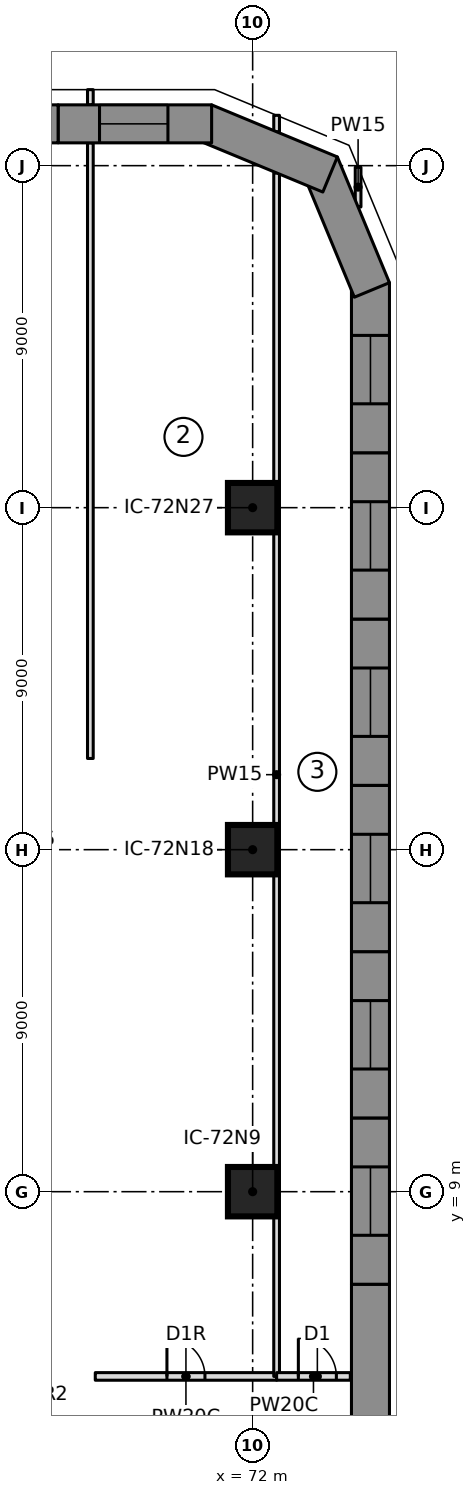
"""IFC4 building model, lengths in metres.
Left out: names, types, materials, properties, quantities, classifications, styles, units other than length and angle.
Written with IfcOpenShell. Run it as: python <this file> out.ifc"""

import sys

from ifc_helpers import new_model, si_unit, direction, frame, frame_2d, origin, origin_2d, place, context, subcontext, project, spatial, polyline, rectangle, outline, extrude, element, fill, save


model = new_model("IFC4")
c1 = context("Model", 3, precision=1e-05, world=origin(), true_north=direction((0.0, 1.0)))
c2 = subcontext(c1, "Body", "Model", "MODEL_VIEW")
j1 = project(units=[si_unit("LENGTHUNIT", "METRE"), si_unit("PLANEANGLEUNIT", "RADIAN")], contexts=[c1])
p1 = place(None, origin())
s1 = spatial("IfcSite", under=j1, at=p1, CompositionType="ELEMENT")
p2 = place(p1, origin())
s2 = spatial("IfcBuilding", under=s1, at=p2, CompositionType="ELEMENT")
p3 = place(p2, frame((0.0, 0.0, 13.5)))
s3 = spatial("IfcBuildingStorey", under=s2, at=p3, CompositionType="ELEMENT", Elevation=13.5)
for number, where, z_axis, x_axis in (
    (1, (72.0, 9.0, 0.0), (0.0, 0.0, 1.0), (1.0, 0.0, 0.0)),
    (2, (72.0, 18.0, 0.0), (0.0, 0.0, 1.0), (1.0, 0.0, 0.0)),
    (3, (72.0, 27.0, 0.0), (0.0, 0.0, 1.0), (1.0, 0.0, 0.0)),
):
    element("IfcColumn", number, at=place(p3, frame(where, z_axis=z_axis, x_axis=x_axis)), inside=s3, PredefinedType="COLUMN", context=c2, shape_type="SweptSolid", body=[
        extrude(rectangle(XDim=1.3, YDim=1.3, at=origin_2d()), origin(), (0.0, 0.0, 1.0), 5.5),
    ])
p4 = place(p3, frame((75.1, 2.188, 0.0), z_axis=(0.0, 0.0, 1.0), x_axis=(0.0, 1.0, 0.0)))
e4 = element("IfcWall", 4, at=p4, inside=s3, PredefinedType="NOTDEFINED", context=c2, shape_type="SweptSolid", body=[
    extrude(outline(polyline([(0.0, -0.5), (4.376, -0.5), (4.376, 0.5), (0.0, 0.5), (0.0, -0.5)])), origin(), (0.0, 0.0, 1.0), 5.2),
])
p5 = place(p3, frame((75.1, 6.564, 0.0), z_axis=(0.0, 0.0, 1.0), x_axis=(0.0, 1.0, 0.0)))
e5 = element("IfcWall", 5, at=p5, inside=s3, PredefinedType="NOTDEFINED", context=c2, shape_type="SweptSolid", body=[
    extrude(outline(polyline([(0.0, -0.5), (4.376, -0.5), (4.376, 0.5), (0.0, 0.5), (0.0, -0.5)])), origin(), (0.0, 0.0, 1.0), 5.2),
])
p6 = place(p5, frame((1.288, 0.0, 0.9)))
e6 = element("IfcOpeningElement", 6, at=p6, cuts=e5, PredefinedType="OPENING", context=c2, shape_type="SweptSolid", body=[
    extrude(rectangle(XDim=1.8, YDim=2.4, at=frame_2d((0.9, 1.2))), frame((0.0, 0.51, 0.0), z_axis=(0.0, -1.0, 0.0), x_axis=(1.0, 0.0, 0.0)), (0.0, 0.0, 1.0), 1.02),
])
p7 = place(p3, frame((75.1, 10.94, 0.0), z_axis=(0.0, 0.0, 1.0), x_axis=(0.0, 1.0, 0.0)))
e7 = element("IfcWall", 7, at=p7, inside=s3, PredefinedType="NOTDEFINED", context=c2, shape_type="SweptSolid", body=[
    extrude(outline(polyline([(0.0, -0.5), (4.376, -0.5), (4.376, 0.5), (0.0, 0.5), (0.0, -0.5)])), origin(), (0.0, 0.0, 1.0), 5.2),
])
p8 = place(p7, frame((1.288, 0.0, 0.9)))
e8 = element("IfcOpeningElement", 8, at=p8, cuts=e7, PredefinedType="OPENING", context=c2, shape_type="SweptSolid", body=[
    extrude(rectangle(XDim=1.8, YDim=2.4, at=frame_2d((0.9, 1.2))), frame((0.0, 0.51, 0.0), z_axis=(0.0, -1.0, 0.0), x_axis=(1.0, 0.0, 0.0)), (0.0, 0.0, 1.0), 1.02),
])
p9 = place(p3, frame((75.1, 15.316, 0.0), z_axis=(0.0, 0.0, 1.0), x_axis=(0.0, 1.0, 0.0)))
e9 = element("IfcWall", 9, at=p9, inside=s3, PredefinedType="NOTDEFINED", context=c2, shape_type="SweptSolid", body=[
    extrude(outline(polyline([(0.0, -0.5), (4.376, -0.5), (4.376, 0.5), (0.0, 0.5), (0.0, -0.5)])), origin(), (0.0, 0.0, 1.0), 5.2),
])
p10 = place(p9, frame((1.288, 0.0, 0.9)))
e10 = element("IfcOpeningElement", 10, at=p10, cuts=e9, PredefinedType="OPENING", context=c2, shape_type="SweptSolid", body=[
    extrude(rectangle(XDim=1.8, YDim=2.4, at=frame_2d((0.9, 1.2))), frame((0.0, 0.51, 0.0), z_axis=(0.0, -1.0, 0.0), x_axis=(1.0, 0.0, 0.0)), (0.0, 0.0, 1.0), 1.02),
])
p11 = place(p3, frame((75.1, 19.693, 0.0), z_axis=(0.0, 0.0, 1.0), x_axis=(0.0, 1.0, 0.0)))
e11 = element("IfcWall", 11, at=p11, inside=s3, PredefinedType="NOTDEFINED", context=c2, shape_type="SweptSolid", body=[
    extrude(outline(polyline([(0.0, -0.5), (4.376, -0.5), (4.376, 0.5), (0.0, 0.5), (0.0, -0.5)])), origin(), (0.0, 0.0, 1.0), 5.2),
])
p12 = place(p11, frame((1.288, 0.0, 0.9)))
e12 = element("IfcOpeningElement", 12, at=p12, cuts=e11, PredefinedType="OPENING", context=c2, shape_type="SweptSolid", body=[
    extrude(rectangle(XDim=1.8, YDim=2.4, at=frame_2d((0.9, 1.2))), frame((0.0, 0.51, 0.0), z_axis=(0.0, -1.0, 0.0), x_axis=(1.0, 0.0, 0.0)), (0.0, 0.0, 1.0), 1.02),
])
p13 = place(p3, frame((75.1, 24.069, 0.0), z_axis=(0.0, 0.0, 1.0), x_axis=(0.0, 1.0, 0.0)))
e13 = element("IfcWall", 13, at=p13, inside=s3, PredefinedType="NOTDEFINED", context=c2, shape_type="SweptSolid", body=[
    extrude(outline(polyline([(0.0, -0.5), (4.376, -0.5), (4.376, 0.5), (0.0, 0.5), (0.0, -0.5)])), origin(), (0.0, 0.0, 1.0), 5.2),
])
p14 = place(p13, frame((1.288, 0.0, 0.9)))
e14 = element("IfcOpeningElement", 14, at=p14, cuts=e13, PredefinedType="OPENING", context=c2, shape_type="SweptSolid", body=[
    extrude(rectangle(XDim=1.8, YDim=2.4, at=frame_2d((0.9, 1.2))), frame((0.0, 0.51, 0.0), z_axis=(0.0, -1.0, 0.0), x_axis=(1.0, 0.0, 0.0)), (0.0, 0.0, 1.0), 1.02),
])
p15 = place(p3, frame((75.1, 28.445, 0.0), z_axis=(0.0, 0.0, 1.0), x_axis=(0.0, 1.0, 0.0)))
e15 = element("IfcWall", 15, at=p15, inside=s3, PredefinedType="NOTDEFINED", context=c2, shape_type="SweptSolid", body=[
    extrude(outline(polyline([(0.0, -0.5), (4.476, -0.5), (4.277, 0.5), (0.0, 0.5), (0.0, -0.5)])), origin(), (0.0, 0.0, 1.0), 5.2),
])
p16 = place(p15, frame((1.288, 0.0, 0.9)))
e16 = element("IfcOpeningElement", 16, at=p16, cuts=e15, PredefinedType="OPENING", context=c2, shape_type="SweptSolid", body=[
    extrude(rectangle(XDim=1.8, YDim=2.4, at=frame_2d((0.9, 1.2))), frame((0.0, 0.51, 0.0), z_axis=(0.0, -1.0, 0.0), x_axis=(1.0, 0.0, 0.0)), (0.0, 0.0, 1.0), 1.02),
])
p17 = place(p3, frame((75.1, 32.821, 0.0), z_axis=(0.0, 0.0, 1.0), x_axis=(-0.382724875529, 0.923862365102, 0.0)))
e17 = element("IfcWall", 17, at=p17, inside=s3, PredefinedType="NOTDEFINED", context=c2, shape_type="SweptSolid", body=[
    extrude(outline(polyline([(-0.1, -0.5), (3.482, -0.5), (3.068, 0.5), (0.1, 0.5), (-0.1, -0.5)])), origin(), (0.0, 0.0, 1.0), 5.2),
])
p18 = place(p3, frame((73.847, 35.847, 0.0), z_axis=(0.0, 0.0, 1.0), x_axis=(-0.923862365102, 0.382724875529, 0.0)))
e18 = element("IfcWall", 18, at=p18, inside=s3, PredefinedType="NOTDEFINED", context=c2, shape_type="SweptSolid", body=[
    extrude(outline(polyline([(-0.207, -0.5), (3.375, -0.5), (3.175, 0.5), (0.207, 0.5), (-0.207, -0.5)])), origin(), (0.0, 0.0, 1.0), 5.2),
])
p19 = place(p3, frame((70.821, 37.1, 0.0), z_axis=(0.0, 0.0, 1.0), x_axis=(-1.0, 0.0, 0.0)))
e19 = element("IfcWall", 19, at=p19, inside=s3, PredefinedType="NOTDEFINED", context=c2, shape_type="SweptSolid", body=[
    extrude(outline(polyline([(-0.1, -0.5), (3.94, -0.5), (3.94, 0.5), (0.1, 0.5), (-0.1, -0.5)])), origin(), (0.0, 0.0, 1.0), 5.2),
])
p20 = place(p19, frame((1.05, 0.0, 0.9)))
e20 = element("IfcOpeningElement", 20, at=p20, cuts=e19, PredefinedType="OPENING", context=c2, shape_type="SweptSolid", body=[
    extrude(rectangle(XDim=1.8, YDim=2.4, at=frame_2d((0.9, 1.2))), frame((0.0, 0.51, 0.0), z_axis=(0.0, -1.0, 0.0), x_axis=(1.0, 0.0, 0.0)), (0.0, 0.0, 1.0), 1.02),
])
p21 = place(p3, frame((66.881, 37.1, 0.0), z_axis=(0.0, 0.0, 1.0), x_axis=(-1.0, 0.0, 0.0)))
e21 = element("IfcWall", 21, at=p21, inside=s3, PredefinedType="NOTDEFINED", context=c2, shape_type="SweptSolid", body=[
    extrude(outline(polyline([(0.0, -0.5), (3.94, -0.5), (3.94, 0.5), (0.0, 0.5), (0.0, -0.5)])), origin(), (0.0, 0.0, 1.0), 5.2),
])
p22 = place(p21, frame((1.07, 0.0, 0.9)))
e22 = element("IfcOpeningElement", 22, at=p22, cuts=e21, PredefinedType="OPENING", context=c2, shape_type="SweptSolid", body=[
    extrude(rectangle(XDim=1.8, YDim=2.4, at=frame_2d((0.9, 1.2))), frame((0.0, 0.51, 0.0), z_axis=(0.0, -1.0, 0.0), x_axis=(1.0, 0.0, 0.0)), (0.0, 0.0, 1.0), 1.02),
])
p23 = place(p3, frame((67.73, 20.4, 0.0), z_axis=(0.0, 0.0, 1.0), x_axis=(0.0, 1.0, 0.0)))
e23 = element("IfcWall", 23, at=p23, inside=s3, PredefinedType="PARTITIONING", context=c2, shape_type="SweptSolid", body=[
    extrude(rectangle(XDim=16.2, YDim=0.15, at=frame_2d((8.1, 0.0))), origin(), (0.0, 0.0, 1.0), 5.15),
])
p24 = place(p3, frame((67.73, 37.6, 0.0), z_axis=(0.0, 0.0, 1.0), x_axis=(0.0, 1.0, 0.0)))
e24 = element("IfcWall", 24, at=p24, inside=s3, PredefinedType="PARTITIONING", context=c2, shape_type="SweptSolid", body=[
    extrude(rectangle(XDim=0.4, YDim=0.15, at=frame_2d((0.2, 0.0))), origin(), (0.0, 0.0, 1.0), 5.15),
])
p25 = place(p3, frame((67.859, 4.139, 0.0), z_axis=(0.0, 0.0, 1.0), x_axis=(1.0, 0.0, 0.0)))
e25 = element("IfcWall", 25, at=p25, inside=s3, PredefinedType="PARTITIONING", context=c2, shape_type="SweptSolid", body=[
    extrude(rectangle(XDim=4.772, YDim=0.2, at=frame_2d((2.386, 0.0))), origin(), (0.0, 0.0, 1.0), 5.15),
])
p26 = place(p25, frame((1.886, 0.0, 0.0)))
e26 = element("IfcOpeningElement", 26, at=p26, cuts=e25, PredefinedType="OPENING", context=c2, shape_type="SweptSolid", body=[
    extrude(rectangle(XDim=1.0, YDim=2.1, at=frame_2d((0.5, 1.05))), frame((0.0, 0.11, 0.0), z_axis=(0.0, -1.0, 0.0), x_axis=(1.0, 0.0, 0.0)), (0.0, 0.0, 1.0), 0.22),
])
p27 = place(p3, frame((72.631, 4.139, 0.0), z_axis=(0.0, 0.0, 1.0), x_axis=(0.0, 1.0, 0.0)))
e27 = element("IfcWall", 27, at=p27, inside=s3, PredefinedType="PARTITIONING", context=c2, shape_type="SweptSolid", body=[
    extrude(rectangle(XDim=31.67, YDim=0.15, at=frame_2d((15.835, 0.0))), origin(), (0.0, 0.0, 1.0), 5.15),
])
p28 = place(p3, frame((72.631, 36.892, 0.0), z_axis=(0.0, 0.0, 1.0), x_axis=(0.0, 1.0, 0.0)))
e28 = element("IfcWall", 28, at=p28, inside=s3, PredefinedType="PARTITIONING", context=c2, shape_type="SweptSolid", body=[
    extrude(rectangle(XDim=0.433, YDim=0.15, at=frame_2d((0.217, 0.0))), origin(), (0.0, 0.0, 1.0), 5.15),
])
p29 = place(p3, frame((72.631, 4.139, 0.0), z_axis=(0.0, 0.0, 1.0), x_axis=(1.0, 0.0, 0.0)))
e29 = element("IfcWall", 29, at=p29, inside=s3, PredefinedType="PARTITIONING", context=c2, shape_type="SweptSolid", body=[
    extrude(rectangle(XDim=1.939, YDim=0.2, at=frame_2d((0.97, 0.0))), origin(), (0.0, 0.0, 1.0), 5.15),
])
p30 = place(p29, frame((0.572, 0.0, 0.0)))
e30 = element("IfcOpeningElement", 30, at=p30, cuts=e29, PredefinedType="OPENING", context=c2, shape_type="SweptSolid", body=[
    extrude(rectangle(XDim=1.0, YDim=2.1, at=frame_2d((0.5, 1.05))), frame((0.0, 0.11, 0.0), z_axis=(0.0, -1.0, 0.0), x_axis=(1.0, 0.0, 0.0)), (0.0, 0.0, 1.0), 0.22),
])
p31 = place(p3, frame((74.775, 34.913, 0.0), z_axis=(0.0, 0.0, 1.0), x_axis=(0.0, 1.0, 0.0)))
e31 = element("IfcWall", 31, at=p31, inside=s3, PredefinedType="PARTITIONING", context=c2, shape_type="SweptSolid", body=[
    extrude(rectangle(XDim=1.045, YDim=0.15, at=frame_2d((0.523, 0.0))), origin(), (0.0, 0.0, 1.0), 5.15),
])
p32 = place(p6, origin())
e32 = element("IfcWindow", 32, at=p32, inside=s3, PartitioningType="SINGLE_PANEL", PredefinedType="WINDOW", context=c2, shape_type="SweptSolid", body=[
    extrude(rectangle(XDim=1.8, YDim=2.4, at=frame_2d((0.9, 1.2))), frame((0.0, 0.5, 0.0), z_axis=(0.0, -1.0, 0.0), x_axis=(1.0, 0.0, 0.0)), (0.0, 0.0, 1.0), 0.06),
])
fill(e6, e32)
p33 = place(p8, origin())
e33 = element("IfcWindow", 33, at=p33, inside=s3, PartitioningType="SINGLE_PANEL", PredefinedType="WINDOW", context=c2, shape_type="SweptSolid", body=[
    extrude(rectangle(XDim=1.8, YDim=2.4, at=frame_2d((0.9, 1.2))), frame((0.0, 0.5, 0.0), z_axis=(0.0, -1.0, 0.0), x_axis=(1.0, 0.0, 0.0)), (0.0, 0.0, 1.0), 0.06),
])
fill(e8, e33)
p34 = place(p10, origin())
e34 = element("IfcWindow", 34, at=p34, inside=s3, PartitioningType="SINGLE_PANEL", PredefinedType="WINDOW", context=c2, shape_type="SweptSolid", body=[
    extrude(rectangle(XDim=1.8, YDim=2.4, at=frame_2d((0.9, 1.2))), frame((0.0, 0.5, 0.0), z_axis=(0.0, -1.0, 0.0), x_axis=(1.0, 0.0, 0.0)), (0.0, 0.0, 1.0), 0.06),
])
fill(e10, e34)
p35 = place(p12, origin())
e35 = element("IfcWindow", 35, at=p35, inside=s3, PartitioningType="SINGLE_PANEL", PredefinedType="WINDOW", context=c2, shape_type="SweptSolid", body=[
    extrude(rectangle(XDim=1.8, YDim=2.4, at=frame_2d((0.9, 1.2))), frame((0.0, 0.5, 0.0), z_axis=(0.0, -1.0, 0.0), x_axis=(1.0, 0.0, 0.0)), (0.0, 0.0, 1.0), 0.06),
])
fill(e12, e35)
p36 = place(p14, origin())
e36 = element("IfcWindow", 36, at=p36, inside=s3, PartitioningType="SINGLE_PANEL", PredefinedType="WINDOW", context=c2, shape_type="SweptSolid", body=[
    extrude(rectangle(XDim=1.8, YDim=2.4, at=frame_2d((0.9, 1.2))), frame((0.0, 0.5, 0.0), z_axis=(0.0, -1.0, 0.0), x_axis=(1.0, 0.0, 0.0)), (0.0, 0.0, 1.0), 0.06),
])
fill(e14, e36)
p37 = place(p16, origin())
e37 = element("IfcWindow", 37, at=p37, inside=s3, PartitioningType="SINGLE_PANEL", PredefinedType="WINDOW", context=c2, shape_type="SweptSolid", body=[
    extrude(rectangle(XDim=1.8, YDim=2.4, at=frame_2d((0.9, 1.2))), frame((0.0, 0.5, 0.0), z_axis=(0.0, -1.0, 0.0), x_axis=(1.0, 0.0, 0.0)), (0.0, 0.0, 1.0), 0.06),
])
fill(e16, e37)
p38 = place(p20, origin())
e38 = element("IfcWindow", 38, at=p38, inside=s3, PartitioningType="SINGLE_PANEL", PredefinedType="WINDOW", context=c2, shape_type="SweptSolid", body=[
    extrude(rectangle(XDim=1.8, YDim=2.4, at=frame_2d((0.9, 1.2))), frame((0.0, 0.5, 0.0), z_axis=(0.0, -1.0, 0.0), x_axis=(1.0, 0.0, 0.0)), (0.0, 0.0, 1.0), 0.06),
])
fill(e20, e38)
p39 = place(p26, origin())
e39 = element("IfcDoor", 39, at=p39, inside=s3, OperationType="SINGLE_SWING_RIGHT", PredefinedType="DOOR", context=c2, shape_type="SweptSolid", body=[
    extrude(rectangle(XDim=1.0, YDim=2.1, at=frame_2d((0.5, 1.05))), frame((0.0, 0.025, 0.0), z_axis=(0.0, -1.0, 0.0), x_axis=(1.0, 0.0, 0.0)), (0.0, 0.0, 1.0), 0.05),
])
fill(e26, e39)
p40 = place(p30, origin())
e40 = element("IfcDoor", 40, at=p40, inside=s3, OperationType="SINGLE_SWING_LEFT", PredefinedType="DOOR", context=c2, shape_type="SweptSolid", body=[
    extrude(rectangle(XDim=1.0, YDim=2.1, at=frame_2d((0.5, 1.05))), frame((0.0, 0.025, 0.0), z_axis=(0.0, -1.0, 0.0), x_axis=(1.0, 0.0, 0.0)), (0.0, 0.0, 1.0), 0.05),
])
fill(e30, e40)
save(model, sys.argv[1])
